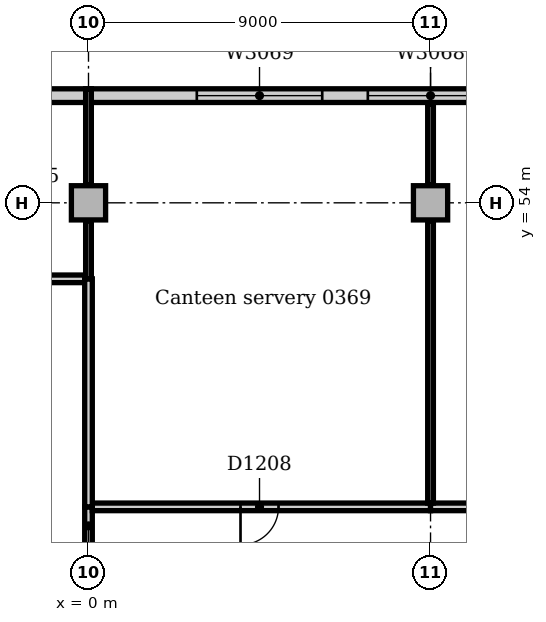
"""IFC4 building model, lengths in metres.
Left out: names, types, materials, properties, quantities, classifications, styles, units other than length and angle.
Written with IfcOpenShell. Run it as: python <this file> out.ifc"""

import sys

from ifc_helpers import new_model, si_unit, direction, frame, frame_2d, origin, origin_2d, place, context, subcontext, project, spatial, rectangle, extrude, element, fill, save


model = new_model("IFC4")
c1 = context("Model", 3, precision=1e-05, world=origin(), true_north=direction((0.0, 1.0)))
c2 = subcontext(c1, "Body", "Model", "MODEL_VIEW")
j1 = project(units=[si_unit("LENGTHUNIT", "METRE"), si_unit("PLANEANGLEUNIT", "RADIAN")], contexts=[c1])
p1 = place(None, origin())
s1 = spatial("IfcSite", under=j1, at=p1, CompositionType="ELEMENT")
p2 = place(p1, origin())
s2 = spatial("IfcBuilding", under=s1, at=p2, CompositionType="ELEMENT")
p3 = place(p2, frame((0.0, 0.0, 16.0)))
s3 = spatial("IfcBuildingStorey", under=s2, at=p3, CompositionType="ELEMENT", Elevation=16.0)
for number, where, z_axis, x_axis in (
    (1, (0.0, 54.0, 0.0), (0.0, 0.0, 1.0), (1.0, 0.0, 0.0)),
    (2, (9.0, 54.0, 0.0), (0.0, 0.0, 1.0), (1.0, 0.0, 0.0)),
):
    element("IfcColumn", number, at=place(p3, frame(where, z_axis=z_axis, x_axis=x_axis)), inside=s3, PredefinedType="COLUMN", context=c2, shape_type="SweptSolid", body=[
        extrude(rectangle(XDim=0.9, YDim=0.9, at=origin_2d()), origin(), (0.0, 0.0, 1.0), 4.7),
    ])
p4 = place(p3, frame((63.0, 56.82, 0.0), z_axis=(0.0, 0.0, 1.0), x_axis=(-1.0, 0.0, 0.0)))
e3 = element("IfcWall", 3, at=p4, inside=s3, PredefinedType="STANDARD", context=c2, shape_type="SweptSolid", body=[
    extrude(rectangle(XDim=144.0, YDim=0.36, at=frame_2d((72.0, 0.0))), origin(), (0.0, 0.0, 1.0), 4.7),
])
p5 = place(p4, frame((2.85, 0.0, 0.9)))
e4 = element("IfcOpeningElement", 4, at=p5, cuts=e3, PredefinedType="OPENING", context=c2, shape_type="SweptSolid", body=[
    extrude(rectangle(XDim=3.3, YDim=2.4, at=frame_2d((1.65, 1.2))), frame((0.0, 0.19, 0.0), z_axis=(0.0, -1.0, 0.0), x_axis=(1.0, 0.0, 0.0)), (0.0, 0.0, 1.0), 0.38),
])
p6 = place(p4, frame((7.35, 0.0, 0.9)))
e5 = element("IfcOpeningElement", 5, at=p6, cuts=e3, PredefinedType="OPENING", context=c2, shape_type="SweptSolid", body=[
    extrude(rectangle(XDim=3.3, YDim=2.4, at=frame_2d((1.65, 1.2))), frame((0.0, 0.19, 0.0), z_axis=(0.0, -1.0, 0.0), x_axis=(1.0, 0.0, 0.0)), (0.0, 0.0, 1.0), 0.38),
])
p7 = place(p4, frame((11.85, 0.0, 0.9)))
e6 = element("IfcOpeningElement", 6, at=p7, cuts=e3, PredefinedType="OPENING", context=c2, shape_type="SweptSolid", body=[
    extrude(rectangle(XDim=3.3, YDim=2.4, at=frame_2d((1.65, 1.2))), frame((0.0, 0.19, 0.0), z_axis=(0.0, -1.0, 0.0), x_axis=(1.0, 0.0, 0.0)), (0.0, 0.0, 1.0), 0.38),
])
p8 = place(p4, frame((16.35, 0.0, 0.9)))
e7 = element("IfcOpeningElement", 7, at=p8, cuts=e3, PredefinedType="OPENING", context=c2, shape_type="SweptSolid", body=[
    extrude(rectangle(XDim=3.3, YDim=2.4, at=frame_2d((1.65, 1.2))), frame((0.0, 0.19, 0.0), z_axis=(0.0, -1.0, 0.0), x_axis=(1.0, 0.0, 0.0)), (0.0, 0.0, 1.0), 0.38),
])
p9 = place(p4, frame((20.85, 0.0, 0.9)))
e8 = element("IfcOpeningElement", 8, at=p9, cuts=e3, PredefinedType="OPENING", context=c2, shape_type="SweptSolid", body=[
    extrude(rectangle(XDim=3.3, YDim=2.4, at=frame_2d((1.65, 1.2))), frame((0.0, 0.19, 0.0), z_axis=(0.0, -1.0, 0.0), x_axis=(1.0, 0.0, 0.0)), (0.0, 0.0, 1.0), 0.38),
])
p10 = place(p4, frame((25.35, 0.0, 0.9)))
e9 = element("IfcOpeningElement", 9, at=p10, cuts=e3, PredefinedType="OPENING", context=c2, shape_type="SweptSolid", body=[
    extrude(rectangle(XDim=3.3, YDim=2.4, at=frame_2d((1.65, 1.2))), frame((0.0, 0.19, 0.0), z_axis=(0.0, -1.0, 0.0), x_axis=(1.0, 0.0, 0.0)), (0.0, 0.0, 1.0), 0.38),
])
p11 = place(p4, frame((29.85, 0.0, 0.9)))
e10 = element("IfcOpeningElement", 10, at=p11, cuts=e3, PredefinedType="OPENING", context=c2, shape_type="SweptSolid", body=[
    extrude(rectangle(XDim=3.3, YDim=2.4, at=frame_2d((1.65, 1.2))), frame((0.0, 0.19, 0.0), z_axis=(0.0, -1.0, 0.0), x_axis=(1.0, 0.0, 0.0)), (0.0, 0.0, 1.0), 0.38),
])
p12 = place(p4, frame((34.35, 0.0, 0.9)))
e11 = element("IfcOpeningElement", 11, at=p12, cuts=e3, PredefinedType="OPENING", context=c2, shape_type="SweptSolid", body=[
    extrude(rectangle(XDim=3.3, YDim=2.4, at=frame_2d((1.65, 1.2))), frame((0.0, 0.19, 0.0), z_axis=(0.0, -1.0, 0.0), x_axis=(1.0, 0.0, 0.0)), (0.0, 0.0, 1.0), 0.38),
])
p13 = place(p4, frame((38.85, 0.0, 0.9)))
e12 = element("IfcOpeningElement", 12, at=p13, cuts=e3, PredefinedType="OPENING", context=c2, shape_type="SweptSolid", body=[
    extrude(rectangle(XDim=3.3, YDim=2.4, at=frame_2d((1.65, 1.2))), frame((0.0, 0.19, 0.0), z_axis=(0.0, -1.0, 0.0), x_axis=(1.0, 0.0, 0.0)), (0.0, 0.0, 1.0), 0.38),
])
p14 = place(p4, frame((43.35, 0.0, 0.9)))
e13 = element("IfcOpeningElement", 13, at=p14, cuts=e3, PredefinedType="OPENING", context=c2, shape_type="SweptSolid", body=[
    extrude(rectangle(XDim=3.3, YDim=2.4, at=frame_2d((1.65, 1.2))), frame((0.0, 0.19, 0.0), z_axis=(0.0, -1.0, 0.0), x_axis=(1.0, 0.0, 0.0)), (0.0, 0.0, 1.0), 0.38),
])
p15 = place(p4, frame((47.85, 0.0, 0.9)))
e14 = element("IfcOpeningElement", 14, at=p15, cuts=e3, PredefinedType="OPENING", context=c2, shape_type="SweptSolid", body=[
    extrude(rectangle(XDim=3.3, YDim=2.4, at=frame_2d((1.65, 1.2))), frame((0.0, 0.19, 0.0), z_axis=(0.0, -1.0, 0.0), x_axis=(1.0, 0.0, 0.0)), (0.0, 0.0, 1.0), 0.38),
])
p16 = place(p4, frame((52.35, 0.0, 0.9)))
e15 = element("IfcOpeningElement", 15, at=p16, cuts=e3, PredefinedType="OPENING", context=c2, shape_type="SweptSolid", body=[
    extrude(rectangle(XDim=3.3, YDim=2.4, at=frame_2d((1.65, 1.2))), frame((0.0, 0.19, 0.0), z_axis=(0.0, -1.0, 0.0), x_axis=(1.0, 0.0, 0.0)), (0.0, 0.0, 1.0), 0.38),
])
p17 = place(p4, frame((56.85, 0.0, 0.9)))
e16 = element("IfcOpeningElement", 16, at=p17, cuts=e3, PredefinedType="OPENING", context=c2, shape_type="SweptSolid", body=[
    extrude(rectangle(XDim=3.3, YDim=2.4, at=frame_2d((1.65, 1.2))), frame((0.0, 0.19, 0.0), z_axis=(0.0, -1.0, 0.0), x_axis=(1.0, 0.0, 0.0)), (0.0, 0.0, 1.0), 0.38),
])
p18 = place(p4, frame((92.85, 0.0, 0.9)))
e17 = element("IfcOpeningElement", 17, at=p18, cuts=e3, PredefinedType="OPENING", context=c2, shape_type="SweptSolid", body=[
    extrude(rectangle(XDim=3.3, YDim=2.4, at=frame_2d((1.65, 1.2))), frame((0.0, 0.19, 0.0), z_axis=(0.0, -1.0, 0.0), x_axis=(1.0, 0.0, 0.0)), (0.0, 0.0, 1.0), 0.38),
])
p19 = place(p4, frame((97.35, 0.0, 0.9)))
e18 = element("IfcOpeningElement", 18, at=p19, cuts=e3, PredefinedType="OPENING", context=c2, shape_type="SweptSolid", body=[
    extrude(rectangle(XDim=3.3, YDim=2.4, at=frame_2d((1.65, 1.2))), frame((0.0, 0.19, 0.0), z_axis=(0.0, -1.0, 0.0), x_axis=(1.0, 0.0, 0.0)), (0.0, 0.0, 1.0), 0.38),
])
p20 = place(p4, frame((101.85, 0.0, 0.9)))
e19 = element("IfcOpeningElement", 19, at=p20, cuts=e3, PredefinedType="OPENING", context=c2, shape_type="SweptSolid", body=[
    extrude(rectangle(XDim=3.3, YDim=2.4, at=frame_2d((1.65, 1.2))), frame((0.0, 0.19, 0.0), z_axis=(0.0, -1.0, 0.0), x_axis=(1.0, 0.0, 0.0)), (0.0, 0.0, 1.0), 0.38),
])
p21 = place(p4, frame((106.35, 0.0, 0.9)))
e20 = element("IfcOpeningElement", 20, at=p21, cuts=e3, PredefinedType="OPENING", context=c2, shape_type="SweptSolid", body=[
    extrude(rectangle(XDim=3.3, YDim=2.4, at=frame_2d((1.65, 1.2))), frame((0.0, 0.19, 0.0), z_axis=(0.0, -1.0, 0.0), x_axis=(1.0, 0.0, 0.0)), (0.0, 0.0, 1.0), 0.38),
])
p22 = place(p4, frame((110.85, 0.0, 0.9)))
e21 = element("IfcOpeningElement", 21, at=p22, cuts=e3, PredefinedType="OPENING", context=c2, shape_type="SweptSolid", body=[
    extrude(rectangle(XDim=3.3, YDim=2.4, at=frame_2d((1.65, 1.2))), frame((0.0, 0.19, 0.0), z_axis=(0.0, -1.0, 0.0), x_axis=(1.0, 0.0, 0.0)), (0.0, 0.0, 1.0), 0.38),
])
p23 = place(p4, frame((115.35, 0.0, 0.9)))
e22 = element("IfcOpeningElement", 22, at=p23, cuts=e3, PredefinedType="OPENING", context=c2, shape_type="SweptSolid", body=[
    extrude(rectangle(XDim=3.3, YDim=2.4, at=frame_2d((1.65, 1.2))), frame((0.0, 0.19, 0.0), z_axis=(0.0, -1.0, 0.0), x_axis=(1.0, 0.0, 0.0)), (0.0, 0.0, 1.0), 0.38),
])
p24 = place(p4, frame((119.85, 0.0, 0.9)))
e23 = element("IfcOpeningElement", 23, at=p24, cuts=e3, PredefinedType="OPENING", context=c2, shape_type="SweptSolid", body=[
    extrude(rectangle(XDim=3.3, YDim=2.4, at=frame_2d((1.65, 1.2))), frame((0.0, 0.19, 0.0), z_axis=(0.0, -1.0, 0.0), x_axis=(1.0, 0.0, 0.0)), (0.0, 0.0, 1.0), 0.38),
])
p25 = place(p4, frame((124.35, 0.0, 0.9)))
e24 = element("IfcOpeningElement", 24, at=p25, cuts=e3, PredefinedType="OPENING", context=c2, shape_type="SweptSolid", body=[
    extrude(rectangle(XDim=3.3, YDim=2.4, at=frame_2d((1.65, 1.2))), frame((0.0, 0.19, 0.0), z_axis=(0.0, -1.0, 0.0), x_axis=(1.0, 0.0, 0.0)), (0.0, 0.0, 1.0), 0.38),
])
p26 = place(p4, frame((128.85, 0.0, 0.9)))
e25 = element("IfcOpeningElement", 25, at=p26, cuts=e3, PredefinedType="OPENING", context=c2, shape_type="SweptSolid", body=[
    extrude(rectangle(XDim=3.3, YDim=2.4, at=frame_2d((1.65, 1.2))), frame((0.0, 0.19, 0.0), z_axis=(0.0, -1.0, 0.0), x_axis=(1.0, 0.0, 0.0)), (0.0, 0.0, 1.0), 0.38),
])
p27 = place(p4, frame((133.35, 0.0, 0.9)))
e26 = element("IfcOpeningElement", 26, at=p27, cuts=e3, PredefinedType="OPENING", context=c2, shape_type="SweptSolid", body=[
    extrude(rectangle(XDim=3.3, YDim=2.4, at=frame_2d((1.65, 1.2))), frame((0.0, 0.19, 0.0), z_axis=(0.0, -1.0, 0.0), x_axis=(1.0, 0.0, 0.0)), (0.0, 0.0, 1.0), 0.38),
])
p28 = place(p4, frame((137.85, 0.0, 0.9)))
e27 = element("IfcOpeningElement", 27, at=p28, cuts=e3, PredefinedType="OPENING", context=c2, shape_type="SweptSolid", body=[
    extrude(rectangle(XDim=3.3, YDim=2.4, at=frame_2d((1.65, 1.2))), frame((0.0, 0.19, 0.0), z_axis=(0.0, -1.0, 0.0), x_axis=(1.0, 0.0, 0.0)), (0.0, 0.0, 1.0), 0.38),
])
p29 = place(p3, frame((0.0, 45.0, 0.0), z_axis=(0.0, 0.0, 1.0), x_axis=(0.0, 1.0, 0.0)))
e28 = element("IfcWall", 28, at=p29, inside=s3, PredefinedType="PARTITIONING", context=c2, shape_type="SweptSolid", body=[
    extrude(rectangle(XDim=1.0, YDim=0.2, at=frame_2d((0.5, 0.0))), origin(), (0.0, 0.0, 1.0), 4.7),
])
p30 = place(p3, frame((0.1, 46.0, 0.0), z_axis=(0.0, 0.0, 1.0), x_axis=(1.0, 0.0, 0.0)))
e29 = element("IfcWall", 29, at=p30, inside=s3, PredefinedType="PARTITIONING", context=c2, shape_type="SweptSolid", body=[
    extrude(rectangle(XDim=8.9, YDim=0.2, at=frame_2d((4.45, 0.0))), origin(), (0.0, 0.0, 1.0), 4.7),
])
p31 = place(p30, frame((3.9, 0.0, 0.0)))
e30 = element("IfcOpeningElement", 30, at=p31, cuts=e29, PredefinedType="OPENING", context=c2, shape_type="SweptSolid", body=[
    extrude(rectangle(XDim=1.0, YDim=2.1, at=frame_2d((0.5, 1.05))), frame((0.0, 0.11, 0.0), z_axis=(0.0, -1.0, 0.0), x_axis=(1.0, 0.0, 0.0)), (0.0, 0.0, 1.0), 0.22),
])
p32 = place(p3, frame((9.0, 46.0, 0.0), z_axis=(0.0, 0.0, 1.0), x_axis=(1.0, 0.0, 0.0)))
e31 = element("IfcWall", 31, at=p32, inside=s3, PredefinedType="PARTITIONING", context=c2, shape_type="SweptSolid", body=[
    extrude(rectangle(XDim=9.0, YDim=0.2, at=frame_2d((4.5, 0.0))), origin(), (0.0, 0.0, 1.0), 4.7),
])
p33 = place(p32, frame((4.0, 0.0, 0.0)))
e32 = element("IfcOpeningElement", 32, at=p33, cuts=e31, PredefinedType="OPENING", context=c2, shape_type="SweptSolid", body=[
    extrude(rectangle(XDim=1.0, YDim=2.1, at=frame_2d((0.5, 1.05))), frame((0.0, 0.11, 0.0), z_axis=(0.0, -1.0, 0.0), x_axis=(1.0, 0.0, 0.0)), (0.0, 0.0, 1.0), 0.22),
])
p34 = place(p3, frame((-9.0, 52.0, 0.0), z_axis=(0.0, 0.0, 1.0), x_axis=(1.0, 0.0, 0.0)))
e33 = element("IfcWall", 33, at=p34, inside=s3, PredefinedType="PARTITIONING", context=c2, shape_type="SweptSolid", body=[
    extrude(rectangle(XDim=8.9, YDim=0.2, at=frame_2d((4.45, 0.0))), origin(), (0.0, 0.0, 1.0), 4.7),
])
p35 = place(p34, frame((4.0, 0.0, 0.0)))
e34 = element("IfcOpeningElement", 34, at=p35, cuts=e33, PredefinedType="OPENING", context=c2, shape_type="SweptSolid", body=[
    extrude(rectangle(XDim=1.0, YDim=2.1, at=frame_2d((0.5, 1.05))), frame((0.0, 0.11, 0.0), z_axis=(0.0, -1.0, 0.0), x_axis=(1.0, 0.0, 0.0)), (0.0, 0.0, 1.0), 0.22),
])
p36 = place(p3, frame((0.0, 46.0, 0.0), z_axis=(0.0, 0.0, 1.0), x_axis=(0.0, 1.0, 0.0)))
e35 = element("IfcWall", 35, at=p36, inside=s3, PredefinedType="PARTITIONING", context=c2, shape_type="SweptSolid", body=[
    extrude(rectangle(XDim=6.0, YDim=0.2, at=frame_2d((3.0, 0.0))), origin(), (0.0, 0.0, 1.0), 4.7),
])
p37 = place(p3, frame((0.0, 52.0, 0.0), z_axis=(0.0, 0.0, 1.0), x_axis=(0.0, 1.0, 0.0)))
e36 = element("IfcWall", 36, at=p37, inside=s3, PredefinedType="PARTITIONING", context=c2, shape_type="SweptSolid", body=[
    extrude(rectangle(XDim=1.53, YDim=0.15, at=frame_2d((0.765, 0.0))), origin(), (0.0, 0.0, 1.0), 4.7),
])
p38 = place(p3, frame((0.0, 54.47, 0.0), z_axis=(0.0, 0.0, 1.0), x_axis=(0.0, 1.0, 0.0)))
e37 = element("IfcWall", 37, at=p38, inside=s3, PredefinedType="PARTITIONING", context=c2, shape_type="SweptSolid", body=[
    extrude(rectangle(XDim=2.53, YDim=0.15, at=frame_2d((1.265, 0.0))), origin(), (0.0, 0.0, 1.0), 4.7),
])
p39 = place(p3, frame((9.0, 46.1, 0.0), z_axis=(0.0, 0.0, 1.0), x_axis=(0.0, 1.0, 0.0)))
e38 = element("IfcWall", 38, at=p39, inside=s3, PredefinedType="PARTITIONING", context=c2, shape_type="SweptSolid", body=[
    extrude(rectangle(XDim=7.43, YDim=0.15, at=frame_2d((3.715, 0.0))), origin(), (0.0, 0.0, 1.0), 4.7),
])
p40 = place(p3, frame((9.0, 54.47, 0.0), z_axis=(0.0, 0.0, 1.0), x_axis=(0.0, 1.0, 0.0)))
e39 = element("IfcWall", 39, at=p40, inside=s3, PredefinedType="PARTITIONING", context=c2, shape_type="SweptSolid", body=[
    extrude(rectangle(XDim=2.13, YDim=0.15, at=frame_2d((1.065, 0.0))), origin(), (0.0, 0.0, 1.0), 4.7),
])
p41 = place(p16, origin())
e40 = element("IfcWindow", 40, at=p41, inside=s3, PartitioningType="SINGLE_PANEL", PredefinedType="WINDOW", context=c2, shape_type="SweptSolid", body=[
    extrude(rectangle(XDim=3.3, YDim=2.4, at=frame_2d((1.65, 1.2))), frame((0.0, 0.13, 0.0), z_axis=(0.0, -1.0, 0.0), x_axis=(1.0, 0.0, 0.0)), (0.0, 0.0, 1.0), 0.06),
])
fill(e15, e40)
p42 = place(p17, origin())
e41 = element("IfcWindow", 41, at=p42, inside=s3, PartitioningType="SINGLE_PANEL", PredefinedType="WINDOW", context=c2, shape_type="SweptSolid", body=[
    extrude(rectangle(XDim=3.3, YDim=2.4, at=frame_2d((1.65, 1.2))), frame((0.0, 0.13, 0.0), z_axis=(0.0, -1.0, 0.0), x_axis=(1.0, 0.0, 0.0)), (0.0, 0.0, 1.0), 0.06),
])
fill(e16, e41)
p43 = place(p31, frame((1.0, 0.0, 0.0), z_axis=(0.0, 0.0, 1.0), x_axis=(-1.0, 0.0, 0.0)))
e42 = element("IfcDoor", 42, at=p43, inside=s3, OperationType="SINGLE_SWING_RIGHT", PredefinedType="DOOR", context=c2, shape_type="SweptSolid", body=[
    extrude(rectangle(XDim=1.0, YDim=2.1, at=frame_2d((0.5, 1.05))), frame((0.0, 0.025, 0.0), z_axis=(0.0, -1.0, 0.0), x_axis=(1.0, 0.0, 0.0)), (0.0, 0.0, 1.0), 0.05),
])
fill(e30, e42)
save(model, sys.argv[1])
